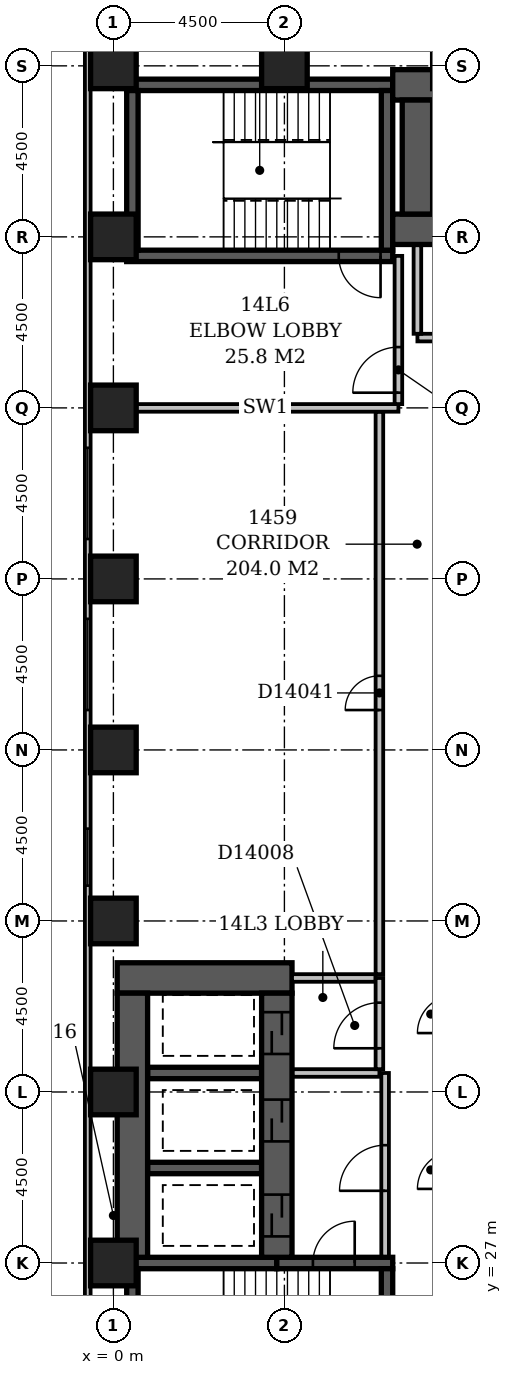
"""IFC4 building model, lengths in metres.
Left out: names, types, materials, properties, quantities, classifications, styles, units other than length and angle.
Written with IfcOpenShell. Run it as: python <this file> out.ifc"""

import sys

from ifc_helpers import new_model, si_unit, direction, frame, frame_2d, origin, origin_2d, place, context, subcontext, project, spatial, rectangle, extrude, element, fill, save


model = new_model("IFC4")
c1 = context("Model", 3, precision=1e-05, world=origin(), true_north=direction((0.0, 1.0)))
c2 = subcontext(c1, "Body", "Model", "MODEL_VIEW")
j1 = project(units=[si_unit("LENGTHUNIT", "METRE"), si_unit("PLANEANGLEUNIT", "RADIAN")], contexts=[c1])
p1 = place(None, origin())
s1 = spatial("IfcSite", under=j1, at=p1, CompositionType="ELEMENT")
p2 = place(p1, origin())
s2 = spatial("IfcBuilding", under=s1, at=p2, CompositionType="ELEMENT")
p3 = place(p2, frame((0.0, 0.0, 61.4)))
s3 = spatial("IfcBuildingStorey", under=s2, at=p3, CompositionType="ELEMENT", Elevation=61.4)
p4 = place(p3, frame((0.1, 34.5, -0.3), z_axis=(0.0, 0.0, 1.0), x_axis=(1.0, 0.0, 0.0)))
e1 = element("IfcWall", 1, at=p4, inside=s3, PredefinedType="SHEAR", context=c2, shape_type="SweptSolid", body=[
    extrude(rectangle(XDim=4.6, YDim=0.8, at=frame_2d((2.3, 0.0))), origin(), (0.0, 0.0, 1.0), 3.6),
])
p5 = place(p3, frame((0.35, 27.0, -0.3), z_axis=(0.0, 0.0, 1.0), x_axis=(1.0, 0.0, 0.0)))
e2 = element("IfcWall", 2, at=p5, inside=s3, PredefinedType="SHEAR", context=c2, shape_type="SweptSolid", body=[
    extrude(rectangle(XDim=3.95, YDim=0.3, at=frame_2d((1.975, 0.0))), origin(), (0.0, 0.0, 1.0), 3.6),
])
p6 = place(p3, frame((0.35, 53.5, -0.3), z_axis=(0.0, 0.0, 1.0), x_axis=(1.0, 0.0, 0.0)))
e3 = element("IfcWall", 3, at=p6, inside=s3, PredefinedType="SHEAR", context=c2, shape_type="SweptSolid", body=[
    extrude(rectangle(XDim=7.0, YDim=0.3, at=frame_2d((3.5, 0.0))), origin(), (0.0, 0.0, 1.0), 3.6),
])
p7 = place(p6, frame((5.58, 0.0, 0.3)))
e4 = element("IfcOpeningElement", 4, at=p7, cuts=e3, PredefinedType="OPENING", context=c2, shape_type="SweptSolid", body=[
    extrude(rectangle(XDim=1.1, YDim=2.1, at=frame_2d((0.55, 1.05))), frame((0.0, 0.162, 0.0), z_axis=(0.0, -1.0, 0.0), x_axis=(1.0, 0.0, 0.0)), (0.0, 0.0, 1.0), 0.324),
])
p8 = place(p3, frame((0.35, 58.0, -0.3), z_axis=(0.0, 0.0, 1.0), x_axis=(1.0, 0.0, 0.0)))
e5 = element("IfcWall", 5, at=p8, inside=s3, PredefinedType="SHEAR", context=c2, shape_type="SweptSolid", body=[
    extrude(rectangle(XDim=7.0, YDim=0.3, at=frame_2d((3.5, 0.0))), origin(), (0.0, 0.0, 1.0), 3.6),
])
p9 = place(p3, frame((0.5, 22.65, -0.3), z_axis=(0.0, 0.0, 1.0), x_axis=(0.0, 1.0, 0.0)))
e6 = element("IfcWall", 6, at=p9, inside=s3, PredefinedType="SHEAR", context=c2, shape_type="SweptSolid", body=[
    extrude(rectangle(XDim=4.2, YDim=0.3, at=frame_2d((2.1, 0.0))), origin(), (0.0, 0.0, 1.0), 3.6),
])
p10 = place(p3, frame((0.5, 27.15, -0.3), z_axis=(0.0, 0.0, 1.0), x_axis=(0.0, 1.0, 0.0)))
e7 = element("IfcWall", 7, at=p10, inside=s3, PredefinedType="SHEAR", context=c2, shape_type="SweptSolid", body=[
    extrude(rectangle(XDim=6.95, YDim=0.8, at=frame_2d((3.475, 0.0))), origin(), (0.0, 0.0, 1.0), 3.6),
])
p11 = place(p3, frame((0.5, 53.65, -0.3), z_axis=(0.0, 0.0, 1.0), x_axis=(0.0, 1.0, 0.0)))
e8 = element("IfcWall", 8, at=p11, inside=s3, PredefinedType="SHEAR", context=c2, shape_type="SweptSolid", body=[
    extrude(rectangle(XDim=4.2, YDim=0.3, at=frame_2d((2.1, 0.0))), origin(), (0.0, 0.0, 1.0), 3.6),
])
for number, where, z_axis, x_axis in (
    (9, (0.9, 29.5, -0.3), (0.0, 0.0, 1.0), (1.0, 0.0, 0.0)),
    (10, (0.9, 32.0, -0.3), (0.0, 0.0, 1.0), (1.0, 0.0, 0.0)),
):
    element("IfcWall", number, at=place(p3, frame(where, z_axis=z_axis, x_axis=x_axis)), inside=s3, PredefinedType="SHEAR", context=c2, shape_type="SweptSolid", body=[
        extrude(rectangle(XDim=3.0, YDim=0.3, at=frame_2d((1.5, 0.0))), origin(), (0.0, 0.0, 1.0), 3.6),
    ])
p12 = place(p3, frame((4.3, 27.0, -0.3), z_axis=(0.0, 0.0, 1.0), x_axis=(1.0, 0.0, 0.0)))
e11 = element("IfcWall", 11, at=p12, inside=s3, PredefinedType="SHEAR", context=c2, shape_type="SweptSolid", body=[
    extrude(rectangle(XDim=3.05, YDim=0.3, at=frame_2d((1.525, 0.0))), origin(), (0.0, 0.0, 1.0), 3.6),
])
p13 = place(p12, frame((0.95, 0.0, 0.3)))
e12 = element("IfcOpeningElement", 12, at=p13, cuts=e11, PredefinedType="OPENING", context=c2, shape_type="SweptSolid", body=[
    extrude(rectangle(XDim=1.1, YDim=2.1, at=frame_2d((0.55, 1.05))), frame((0.0, 0.162, 0.0), z_axis=(0.0, -1.0, 0.0), x_axis=(1.0, 0.0, 0.0)), (0.0, 0.0, 1.0), 0.324),
])
p14 = place(p3, frame((4.3, 27.15, -0.3), z_axis=(0.0, 0.0, 1.0), x_axis=(0.0, 1.0, 0.0)))
e13 = element("IfcWall", 13, at=p14, inside=s3, PredefinedType="SHEAR", context=c2, shape_type="SweptSolid", body=[
    extrude(rectangle(XDim=6.95, YDim=0.8, at=frame_2d((3.475, 0.0))), origin(), (0.0, 0.0, 1.0), 3.6),
])
p15 = place(p14, frame((3.05, 0.0, 0.3)))
e14 = element("IfcOpeningElement", 14, at=p15, cuts=e13, PredefinedType="OPENING", context=c2, shape_type="SweptSolid", body=[
    extrude(rectangle(XDim=1.1, YDim=2.1, at=frame_2d((0.55, 1.05))), frame((0.0, 0.412, 0.0), z_axis=(0.0, -1.0, 0.0), x_axis=(1.0, 0.0, 0.0)), (0.0, 0.0, 1.0), 0.824),
])
p16 = place(p14, frame((0.55, 0.0, 0.3)))
e15 = element("IfcOpeningElement", 15, at=p16, cuts=e13, PredefinedType="OPENING", context=c2, shape_type="SweptSolid", body=[
    extrude(rectangle(XDim=1.1, YDim=2.1, at=frame_2d((0.55, 1.05))), frame((0.0, 0.412, 0.0), z_axis=(0.0, -1.0, 0.0), x_axis=(1.0, 0.0, 0.0)), (0.0, 0.0, 1.0), 0.824),
])
p17 = place(p14, frame((5.35, 0.0, 0.3)))
e16 = element("IfcOpeningElement", 16, at=p17, cuts=e13, PredefinedType="OPENING", context=c2, shape_type="SweptSolid", body=[
    extrude(rectangle(XDim=1.1, YDim=2.1, at=frame_2d((0.55, 1.05))), frame((0.0, 0.412, 0.0), z_axis=(0.0, -1.0, 0.0), x_axis=(1.0, 0.0, 0.0)), (0.0, 0.0, 1.0), 0.824),
])
p18 = place(p3, frame((7.2, 22.65, -0.3), z_axis=(0.0, 0.0, 1.0), x_axis=(0.0, 1.0, 0.0)))
e17 = element("IfcWall", 17, at=p18, inside=s3, PredefinedType="SHEAR", context=c2, shape_type="SweptSolid", body=[
    extrude(rectangle(XDim=4.2, YDim=0.3, at=frame_2d((2.1, 0.0))), origin(), (0.0, 0.0, 1.0), 3.6),
])
p19 = place(p18, frame((0.8, 0.0, 0.3)))
e18 = element("IfcOpeningElement", 18, at=p19, cuts=e17, PredefinedType="OPENING", context=c2, shape_type="SweptSolid", body=[
    extrude(rectangle(XDim=1.1, YDim=2.1, at=frame_2d((0.55, 1.05))), frame((0.0, 0.162, 0.0), z_axis=(0.0, -1.0, 0.0), x_axis=(1.0, 0.0, 0.0)), (0.0, 0.0, 1.0), 0.324),
])
p20 = place(p3, frame((7.2, 53.65, -0.3), z_axis=(0.0, 0.0, 1.0), x_axis=(0.0, 1.0, 0.0)))
e19 = element("IfcWall", 19, at=p20, inside=s3, PredefinedType="SHEAR", context=c2, shape_type="SweptSolid", body=[
    extrude(rectangle(XDim=4.2, YDim=0.3, at=frame_2d((2.1, 0.0))), origin(), (0.0, 0.0, 1.0), 3.6),
])
p21 = place(p3, frame((7.35, 54.2, -0.3), z_axis=(0.0, 0.0, 1.0), x_axis=(1.0, 0.0, 0.0)))
e20 = element("IfcWall", 20, at=p21, inside=s3, PredefinedType="SHEAR", context=c2, shape_type="SweptSolid", body=[
    extrude(rectangle(XDim=16.45, YDim=0.8, at=frame_2d((8.225, 0.0))), origin(), (0.0, 0.0, 1.0), 3.6),
])
p22 = place(p21, frame((1.35, 0.0, 0.3)))
e21 = element("IfcOpeningElement", 21, at=p22, cuts=e20, PredefinedType="OPENING", context=c2, shape_type="SweptSolid", body=[
    extrude(rectangle(XDim=1.1, YDim=2.1, at=frame_2d((0.55, 1.05))), frame((0.0, 0.412, 0.0), z_axis=(0.0, -1.0, 0.0), x_axis=(1.0, 0.0, 0.0)), (0.0, 0.0, 1.0), 0.824),
])
p23 = place(p21, frame((3.85, 0.0, 0.3)))
e22 = element("IfcOpeningElement", 22, at=p23, cuts=e20, PredefinedType="OPENING", context=c2, shape_type="SweptSolid", body=[
    extrude(rectangle(XDim=1.1, YDim=2.1, at=frame_2d((0.55, 1.05))), frame((0.0, 0.412, 0.0), z_axis=(0.0, -1.0, 0.0), x_axis=(1.0, 0.0, 0.0)), (0.0, 0.0, 1.0), 0.824),
])
p24 = place(p21, frame((6.35, 0.0, 0.3)))
e23 = element("IfcOpeningElement", 23, at=p24, cuts=e20, PredefinedType="OPENING", context=c2, shape_type="SweptSolid", body=[
    extrude(rectangle(XDim=1.1, YDim=2.1, at=frame_2d((0.55, 1.05))), frame((0.0, 0.412, 0.0), z_axis=(0.0, -1.0, 0.0), x_axis=(1.0, 0.0, 0.0)), (0.0, 0.0, 1.0), 0.824),
])
p25 = place(p21, frame((8.85, 0.0, 0.3)))
e24 = element("IfcOpeningElement", 24, at=p25, cuts=e20, PredefinedType="OPENING", context=c2, shape_type="SweptSolid", body=[
    extrude(rectangle(XDim=1.1, YDim=2.1, at=frame_2d((0.55, 1.05))), frame((0.0, 0.412, 0.0), z_axis=(0.0, -1.0, 0.0), x_axis=(1.0, 0.0, 0.0)), (0.0, 0.0, 1.0), 0.824),
])
p26 = place(p21, frame((11.35, 0.0, 0.3)))
e25 = element("IfcOpeningElement", 25, at=p26, cuts=e20, PredefinedType="OPENING", context=c2, shape_type="SweptSolid", body=[
    extrude(rectangle(XDim=1.1, YDim=2.1, at=frame_2d((0.55, 1.05))), frame((0.0, 0.412, 0.0), z_axis=(0.0, -1.0, 0.0), x_axis=(1.0, 0.0, 0.0)), (0.0, 0.0, 1.0), 0.824),
])
p27 = place(p21, frame((13.85, 0.0, 0.3)))
e26 = element("IfcOpeningElement", 26, at=p27, cuts=e20, PredefinedType="OPENING", context=c2, shape_type="SweptSolid", body=[
    extrude(rectangle(XDim=1.1, YDim=2.1, at=frame_2d((0.55, 1.05))), frame((0.0, 0.412, 0.0), z_axis=(0.0, -1.0, 0.0), x_axis=(1.0, 0.0, 0.0)), (0.0, 0.0, 1.0), 0.824),
])
p28 = place(p3, frame((7.35, 58.0, -0.3), z_axis=(0.0, 0.0, 1.0), x_axis=(1.0, 0.0, 0.0)))
e27 = element("IfcWall", 27, at=p28, inside=s3, PredefinedType="SHEAR", context=c2, shape_type="SweptSolid", body=[
    extrude(rectangle(XDim=16.45, YDim=0.8, at=frame_2d((8.225, 0.0))), origin(), (0.0, 0.0, 1.0), 3.6),
])
p29 = place(p3, frame((8.0, 54.6, -0.3), z_axis=(0.0, 0.0, 1.0), x_axis=(0.0, 1.0, 0.0)))
e28 = element("IfcWall", 28, at=p29, inside=s3, PredefinedType="SHEAR", context=c2, shape_type="SweptSolid", body=[
    extrude(rectangle(XDim=3.0, YDim=0.8, at=frame_2d((1.5, 0.0))), origin(), (0.0, 0.0, 1.0), 3.6),
])
for number, where, z_axis, x_axis in (
    (29, (0.0, 27.0, -0.3), (0.0, 0.0, 1.0), (1.0, 0.0, 0.0)),
    (30, (0.0, 31.5, -0.3), (0.0, 0.0, 1.0), (1.0, 0.0, 0.0)),
    (31, (0.0, 36.0, -0.3), (0.0, 0.0, 1.0), (1.0, 0.0, 0.0)),
    (32, (0.0, 40.5, -0.3), (0.0, 0.0, 1.0), (1.0, 0.0, 0.0)),
    (33, (0.0, 45.0, -0.3), (0.0, 0.0, 1.0), (1.0, 0.0, 0.0)),
    (34, (0.0, 49.5, -0.3), (0.0, 0.0, 1.0), (1.0, 0.0, 0.0)),
    (35, (0.0, 54.0, -0.3), (0.0, 0.0, 1.0), (1.0, 0.0, 0.0)),
    (36, (0.0, 58.5, -0.3), (0.0, 0.0, 1.0), (1.0, 0.0, 0.0)),
    (37, (4.5, 58.5, -0.3), (0.0, 0.0, 1.0), (1.0, 0.0, 0.0)),
):
    element("IfcColumn", number, at=place(p3, frame(where, z_axis=z_axis, x_axis=x_axis)), inside=s3, PredefinedType="COLUMN", context=c2, shape_type="SweptSolid", body=[
        extrude(rectangle(XDim=1.2, YDim=1.2, at=origin_2d()), origin(), (0.0, 0.0, 1.0), 3.6),
    ])
p30 = place(p3, frame((-0.675, 59.1, 0.0), z_axis=(0.0, 0.0, 1.0), x_axis=(0.0, -1.0, 0.0)))
e38 = element("IfcWall", 38, at=p30, inside=s3, PredefinedType="STANDARD", context=c2, shape_type="SweptSolid", body=[
    extrude(rectangle(XDim=55.35, YDim=0.15, at=frame_2d((27.675, 0.0))), origin(), (0.0, 0.0, 1.0), 2.7),
])
p31 = place(p30, frame((10.65, 0.0, 0.6)))
e39 = element("IfcOpeningElement", 39, at=p31, cuts=e38, PredefinedType="OPENING", context=c2, shape_type="SweptSolid", body=[
    extrude(rectangle(XDim=2.4, YDim=1.8, at=frame_2d((1.2, 0.9))), frame((0.0, 0.087, 0.0), z_axis=(0.0, -1.0, 0.0), x_axis=(1.0, 0.0, 0.0)), (0.0, 0.0, 1.0), 0.174),
])
p32 = place(p30, frame((15.15, 0.0, 0.6)))
e40 = element("IfcOpeningElement", 40, at=p32, cuts=e38, PredefinedType="OPENING", context=c2, shape_type="SweptSolid", body=[
    extrude(rectangle(XDim=2.4, YDim=1.8, at=frame_2d((1.2, 0.9))), frame((0.0, 0.087, 0.0), z_axis=(0.0, -1.0, 0.0), x_axis=(1.0, 0.0, 0.0)), (0.0, 0.0, 1.0), 0.174),
])
p33 = place(p30, frame((20.67, 0.0, 0.6)))
e41 = element("IfcOpeningElement", 41, at=p33, cuts=e38, PredefinedType="OPENING", context=c2, shape_type="SweptSolid", body=[
    extrude(rectangle(XDim=1.5, YDim=1.8, at=frame_2d((0.75, 0.9))), frame((0.0, 0.087, 0.0), z_axis=(0.0, -1.0, 0.0), x_axis=(1.0, 0.0, 0.0)), (0.0, 0.0, 1.0), 0.174),
])
p34 = place(p3, frame((8.0, 51.35, 0.0), z_axis=(0.0, 0.0, 1.0), x_axis=(1.0, 0.0, 0.0)))
e42 = element("IfcWall", 42, at=p34, inside=s3, PredefinedType="PARTITIONING", context=c2, shape_type="SweptSolid", body=[
    extrude(rectangle(XDim=15.0, YDim=0.2, at=frame_2d((7.5, 0.0))), origin(), (0.0, 0.0, 1.0), 3.3),
])
p35 = place(p34, frame((3.4, 0.0, 0.0)))
e43 = element("IfcOpeningElement", 43, at=p35, cuts=e42, PredefinedType="OPENING", context=c2, shape_type="SweptSolid", body=[
    extrude(rectangle(XDim=1.2, YDim=2.1, at=frame_2d((0.6, 1.05))), frame((0.0, 0.112, 0.0), z_axis=(0.0, -1.0, 0.0), x_axis=(1.0, 0.0, 0.0)), (0.0, 0.0, 1.0), 0.224),
])
p36 = place(p34, frame((9.4, 0.0, 0.0)))
e44 = element("IfcOpeningElement", 44, at=p36, cuts=e42, PredefinedType="OPENING", context=c2, shape_type="SweptSolid", body=[
    extrude(rectangle(XDim=1.2, YDim=2.1, at=frame_2d((0.6, 1.05))), frame((0.0, 0.112, 0.0), z_axis=(0.0, -1.0, 0.0), x_axis=(1.0, 0.0, 0.0)), (0.0, 0.0, 1.0), 0.224),
])
p37 = place(p3, frame((8.0, 51.45, 0.0), z_axis=(0.0, 0.0, 1.0), x_axis=(0.0, 1.0, 0.0)))
e45 = element("IfcWall", 45, at=p37, inside=s3, PredefinedType="PARTITIONING", context=c2, shape_type="SweptSolid", body=[
    extrude(rectangle(XDim=2.33, YDim=0.2, at=frame_2d((1.165, 0.0))), origin(), (0.0, 0.0, 1.0), 3.3),
])
p38 = place(p3, frame((4.72, 32.0, 0.0), z_axis=(0.0, 0.0, 1.0), x_axis=(1.0, 0.0, 0.0)))
e46 = element("IfcWall", 46, at=p38, inside=s3, PredefinedType="PARTITIONING", context=c2, shape_type="SweptSolid", body=[
    extrude(rectangle(XDim=2.28, YDim=0.2, at=frame_2d((1.14, 0.0))), origin(), (0.0, 0.0, 1.0), 3.3),
])
p39 = place(p3, frame((7.0, 32.1, 0.0), z_axis=(0.0, 0.0, 1.0), x_axis=(0.0, 1.0, 0.0)))
e47 = element("IfcWall", 47, at=p39, inside=s3, PredefinedType="PARTITIONING", context=c2, shape_type="SweptSolid", body=[
    extrude(rectangle(XDim=2.4, YDim=0.2, at=frame_2d((1.2, 0.0))), origin(), (0.0, 0.0, 1.0), 3.3),
])
p40 = place(p39, frame((0.55, 0.0, 0.0)))
e48 = element("IfcOpeningElement", 48, at=p40, cuts=e47, PredefinedType="OPENING", context=c2, shape_type="SweptSolid", body=[
    extrude(rectangle(XDim=1.2, YDim=2.1, at=frame_2d((0.6, 1.05))), frame((0.0, 0.112, 0.0), z_axis=(0.0, -1.0, 0.0), x_axis=(1.0, 0.0, 0.0)), (0.0, 0.0, 1.0), 0.224),
])
p41 = place(p3, frame((4.7, 34.5, 0.0), z_axis=(0.0, 0.0, 1.0), x_axis=(1.0, 0.0, 0.0)))
e49 = element("IfcWall", 49, at=p41, inside=s3, PredefinedType="PARTITIONING", context=c2, shape_type="SweptSolid", body=[
    extrude(rectangle(XDim=2.2, YDim=0.2, at=frame_2d((1.1, 0.0))), origin(), (0.0, 0.0, 1.0), 3.3),
])
p42 = place(p3, frame((7.15, 27.17, 0.0), z_axis=(0.0, 0.0, 1.0), x_axis=(0.0, 1.0, 0.0)))
e50 = element("IfcWall", 50, at=p42, inside=s3, PredefinedType="PARTITIONING", context=c2, shape_type="SweptSolid", body=[
    extrude(rectangle(XDim=4.83, YDim=0.2, at=frame_2d((2.415, 0.0))), origin(), (0.0, 0.0, 1.0), 3.3),
])
p43 = place(p42, frame((1.73, 0.0, 0.0)))
e51 = element("IfcOpeningElement", 51, at=p43, cuts=e50, PredefinedType="OPENING", context=c2, shape_type="SweptSolid", body=[
    extrude(rectangle(XDim=1.2, YDim=2.1, at=frame_2d((0.6, 1.05))), frame((0.0, 0.112, 0.0), z_axis=(0.0, -1.0, 0.0), x_axis=(1.0, 0.0, 0.0)), (0.0, 0.0, 1.0), 0.224),
])
p44 = place(p3, frame((0.5, 49.5, 0.0), z_axis=(0.0, 0.0, 1.0), x_axis=(1.0, 0.0, 0.0)))
e52 = element("IfcWall", 52, at=p44, inside=s3, PredefinedType="PARTITIONING", context=c2, shape_type="SweptSolid", body=[
    extrude(rectangle(XDim=7.0, YDim=0.2, at=frame_2d((3.5, 0.0))), origin(), (0.0, 0.0, 1.0), 3.3),
])
p45 = place(p3, frame((7.5, 49.6, 0.0), z_axis=(0.0, 0.0, 1.0), x_axis=(0.0, 1.0, 0.0)))
e53 = element("IfcWall", 53, at=p45, inside=s3, PredefinedType="PARTITIONING", context=c2, shape_type="SweptSolid", body=[
    extrude(rectangle(XDim=3.9, YDim=0.2, at=frame_2d((1.95, 0.0))), origin(), (0.0, 0.0, 1.0), 3.3),
])
p46 = place(p45, frame((0.3, 0.0, 0.0)))
e54 = element("IfcOpeningElement", 54, at=p46, cuts=e53, PredefinedType="OPENING", context=c2, shape_type="SweptSolid", body=[
    extrude(rectangle(XDim=1.2, YDim=2.1, at=frame_2d((0.6, 1.05))), frame((0.0, 0.112, 0.0), z_axis=(0.0, -1.0, 0.0), x_axis=(1.0, 0.0, 0.0)), (0.0, 0.0, 1.0), 0.224),
])
p47 = place(p3, frame((7.0, 34.6, 0.0), z_axis=(0.0, 0.0, 1.0), x_axis=(0.0, 1.0, 0.0)))
e55 = element("IfcWall", 55, at=p47, inside=s3, PredefinedType="PARTITIONING", context=c2, shape_type="SweptSolid", body=[
    extrude(rectangle(XDim=14.8, YDim=0.2, at=frame_2d((7.4, 0.0))), origin(), (0.0, 0.0, 1.0), 3.3),
])
p48 = place(p47, frame((6.95, 0.0, 0.0)))
e56 = element("IfcOpeningElement", 56, at=p48, cuts=e55, PredefinedType="OPENING", context=c2, shape_type="SweptSolid", body=[
    extrude(rectangle(XDim=0.9, YDim=2.1, at=frame_2d((0.45, 1.05))), frame((0.0, 0.112, 0.0), z_axis=(0.0, -1.0, 0.0), x_axis=(1.0, 0.0, 0.0)), (0.0, 0.0, 1.0), 0.224),
])
p49 = place(p31, origin())
e57 = element("IfcWindow", 57, at=p49, inside=s3, PartitioningType="SINGLE_PANEL", PredefinedType="WINDOW", context=c2, shape_type="SweptSolid", body=[
    extrude(rectangle(XDim=2.4, YDim=1.8, at=frame_2d((1.2, 0.9))), frame((0.0, 0.03, 0.0), z_axis=(0.0, -1.0, 0.0), x_axis=(1.0, 0.0, 0.0)), (0.0, 0.0, 1.0), 0.06),
])
fill(e39, e57)
p50 = place(p32, origin())
e58 = element("IfcWindow", 58, at=p50, inside=s3, PartitioningType="SINGLE_PANEL", PredefinedType="WINDOW", context=c2, shape_type="SweptSolid", body=[
    extrude(rectangle(XDim=2.4, YDim=1.8, at=frame_2d((1.2, 0.9))), frame((0.0, 0.03, 0.0), z_axis=(0.0, -1.0, 0.0), x_axis=(1.0, 0.0, 0.0)), (0.0, 0.0, 1.0), 0.06),
])
fill(e40, e58)
p51 = place(p33, origin())
e59 = element("IfcWindow", 59, at=p51, inside=s3, PartitioningType="SINGLE_PANEL", PredefinedType="WINDOW", context=c2, shape_type="SweptSolid", body=[
    extrude(rectangle(XDim=1.5, YDim=1.8, at=frame_2d((0.75, 0.9))), frame((0.0, 0.03, 0.0), z_axis=(0.0, -1.0, 0.0), x_axis=(1.0, 0.0, 0.0)), (0.0, 0.0, 1.0), 0.06),
])
fill(e41, e59)
p52 = place(p46, origin())
e60 = element("IfcDoor", 60, at=p52, inside=s3, OperationType="SINGLE_SWING_LEFT", PredefinedType="DOOR", context=c2, shape_type="SweptSolid", body=[
    extrude(rectangle(XDim=1.2, YDim=2.1, at=frame_2d((0.6, 1.05))), frame((0.0, 0.025, 0.0), z_axis=(0.0, -1.0, 0.0), x_axis=(1.0, 0.0, 0.0)), (0.0, 0.0, 1.0), 0.05),
])
fill(e54, e60)
p53 = place(p43, origin())
e61 = element("IfcDoor", 61, at=p53, inside=s3, OperationType="SINGLE_SWING_LEFT", PredefinedType="DOOR", context=c2, shape_type="SweptSolid", body=[
    extrude(rectangle(XDim=1.2, YDim=2.1, at=frame_2d((0.6, 1.05))), frame((0.0, 0.025, 0.0), z_axis=(0.0, -1.0, 0.0), x_axis=(1.0, 0.0, 0.0)), (0.0, 0.0, 1.0), 0.05),
])
fill(e51, e61)
p54 = place(p15, origin())
e62 = element("IfcDoor", 62, at=p54, inside=s3, OperationType="SLIDING_TO_LEFT", PredefinedType="DOOR", context=c2, shape_type="SweptSolid", body=[
    extrude(rectangle(XDim=1.1, YDim=2.1, at=frame_2d((0.55, 1.05))), frame((0.0, 0.025, 0.0), z_axis=(0.0, -1.0, 0.0), x_axis=(1.0, 0.0, 0.0)), (0.0, 0.0, 1.0), 0.05),
])
fill(e14, e62)
p55 = place(p16, origin())
e63 = element("IfcDoor", 63, at=p55, inside=s3, OperationType="SLIDING_TO_LEFT", PredefinedType="DOOR", context=c2, shape_type="SweptSolid", body=[
    extrude(rectangle(XDim=1.1, YDim=2.1, at=frame_2d((0.55, 1.05))), frame((0.0, 0.025, 0.0), z_axis=(0.0, -1.0, 0.0), x_axis=(1.0, 0.0, 0.0)), (0.0, 0.0, 1.0), 0.05),
])
fill(e15, e63)
p56 = place(p40, origin())
e64 = element("IfcDoor", 64, at=p56, inside=s3, OperationType="SINGLE_SWING_LEFT", PredefinedType="DOOR", context=c2, shape_type="SweptSolid", body=[
    extrude(rectangle(XDim=1.2, YDim=2.1, at=frame_2d((0.6, 1.05))), frame((0.0, 0.025, 0.0), z_axis=(0.0, -1.0, 0.0), x_axis=(1.0, 0.0, 0.0)), (0.0, 0.0, 1.0), 0.05),
])
fill(e48, e64)
p57 = place(p17, origin())
e65 = element("IfcDoor", 65, at=p57, inside=s3, OperationType="SLIDING_TO_LEFT", PredefinedType="DOOR", context=c2, shape_type="SweptSolid", body=[
    extrude(rectangle(XDim=1.1, YDim=2.1, at=frame_2d((0.55, 1.05))), frame((0.0, 0.025, 0.0), z_axis=(0.0, -1.0, 0.0), x_axis=(1.0, 0.0, 0.0)), (0.0, 0.0, 1.0), 0.05),
])
fill(e16, e65)
p58 = place(p13, frame((1.1, 0.0, 0.0), z_axis=(0.0, 0.0, 1.0), x_axis=(-1.0, 0.0, 0.0)))
e66 = element("IfcDoor", 66, at=p58, inside=s3, OperationType="SINGLE_SWING_LEFT", PredefinedType="DOOR", context=c2, shape_type="SweptSolid", body=[
    extrude(rectangle(XDim=1.1, YDim=2.1, at=frame_2d((0.55, 1.05))), frame((0.0, 0.025, 0.0), z_axis=(0.0, -1.0, 0.0), x_axis=(1.0, 0.0, 0.0)), (0.0, 0.0, 1.0), 0.05),
])
fill(e12, e66)
p59 = place(p7, origin())
e67 = element("IfcDoor", 67, at=p59, inside=s3, OperationType="SINGLE_SWING_RIGHT", PredefinedType="DOOR", context=c2, shape_type="SweptSolid", body=[
    extrude(rectangle(XDim=1.1, YDim=2.1, at=frame_2d((0.55, 1.05))), frame((0.0, 0.025, 0.0), z_axis=(0.0, -1.0, 0.0), x_axis=(1.0, 0.0, 0.0)), (0.0, 0.0, 1.0), 0.05),
])
fill(e4, e67)
p60 = place(p48, origin())
e68 = element("IfcDoor", 68, at=p60, inside=s3, OperationType="SINGLE_SWING_LEFT", PredefinedType="DOOR", context=c2, shape_type="SweptSolid", body=[
    extrude(rectangle(XDim=0.9, YDim=2.1, at=frame_2d((0.45, 1.05))), frame((0.0, 0.025, 0.0), z_axis=(0.0, -1.0, 0.0), x_axis=(1.0, 0.0, 0.0)), (0.0, 0.0, 1.0), 0.05),
])
fill(e56, e68)
save(model, sys.argv[1])
